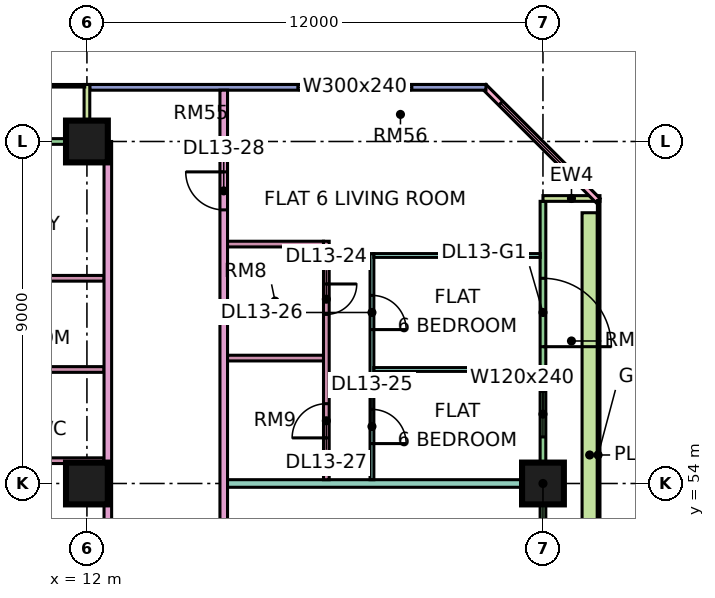
"""IFC4 building model, lengths in metres.
Left out: names, types, materials, properties, quantities, classifications, styles, units other than length and angle.
Written with IfcOpenShell. Run it as: python <this file> out.ifc"""

import sys

from ifc_helpers import new_model, si_unit, direction, frame, frame_2d, origin, origin_2d, place, context, subcontext, project, spatial, rectangle, extrude, element, fill, save


model = new_model("IFC4")
c1 = context("Model", 3, precision=1e-05, world=origin(), true_north=direction((0.0, 1.0)))
c2 = subcontext(c1, "Body", "Model", "MODEL_VIEW")
j1 = project(units=[si_unit("LENGTHUNIT", "METRE"), si_unit("PLANEANGLEUNIT", "RADIAN")], contexts=[c1])
p1 = place(None, origin())
s1 = spatial("IfcSite", under=j1, at=p1, CompositionType="ELEMENT")
p2 = place(p1, origin())
s2 = spatial("IfcBuilding", under=s1, at=p2, CompositionType="ELEMENT")
p3 = place(p2, frame((0.0, 0.0, 63.9)))
s3 = spatial("IfcBuildingStorey", under=s2, at=p3, CompositionType="ELEMENT", Elevation=63.9)
for number, where, z_axis, x_axis in (
    (1, (12.0, 54.0, 0.0), (0.0, 0.0, 1.0), (1.0, 0.0, 0.0)),
    (2, (12.0, 63.0, 0.0), (0.0, 0.0, 1.0), (1.0, 0.0, 0.0)),
    (3, (24.0, 54.0, 0.0), (0.0, 0.0, 1.0), (1.0, 0.0, 0.0)),
):
    element("IfcColumn", number, at=place(p3, frame(where, z_axis=z_axis, x_axis=x_axis)), inside=s3, PredefinedType="COLUMN", context=c2, shape_type="SweptSolid", body=[
        extrude(rectangle(XDim=1.1, YDim=1.1, at=origin_2d()), origin(), (0.0, 0.0, 1.0), 3.75),
    ])
p4 = place(p3, frame((24.0, 48.075, 0.0), z_axis=(0.0, 0.0, 1.0), x_axis=(0.0, 1.0, 0.0)))
e4 = element("IfcWall", 4, at=p4, inside=s3, PredefinedType="SOLIDWALL", context=c2, shape_type="SweptSolid", body=[
    extrude(rectangle(XDim=13.35, YDim=0.15, at=frame_2d((6.675, 0.0))), origin(), (0.0, 0.0, 1.0), 3.35),
])
p5 = place(p4, frame((0.538, 0.0, 0.45)))
e5 = element("IfcOpeningElement", 5, at=p5, cuts=e4, PredefinedType="OPENING", context=c2, shape_type="SweptSolid", body=[
    extrude(rectangle(XDim=4.2, YDim=2.4, at=frame_2d((2.1, 1.2))), frame((0.0, 0.085, 0.0), z_axis=(0.0, -1.0, 0.0), x_axis=(1.0, 0.0, 0.0)), (0.0, 0.0, 1.0), 0.17),
])
p6 = place(p4, frame((7.15, 0.0, 0.45)))
e6 = element("IfcOpeningElement", 6, at=p6, cuts=e4, PredefinedType="OPENING", context=c2, shape_type="SweptSolid", body=[
    extrude(rectangle(XDim=1.2, YDim=2.4, at=frame_2d((0.6, 1.2))), frame((0.0, 0.085, 0.0), z_axis=(0.0, -1.0, 0.0), x_axis=(1.0, 0.0, 0.0)), (0.0, 0.0, 1.0), 0.17),
])
p7 = place(p4, frame((9.525, 0.0, 0.0)))
e7 = element("IfcOpeningElement", 7, at=p7, cuts=e4, PredefinedType="OPENING", context=c2, shape_type="SweptSolid", body=[
    extrude(rectangle(XDim=1.8, YDim=2.4, at=frame_2d((0.9, 1.2))), frame((0.0, 0.085, 0.0), z_axis=(0.0, -1.0, 0.0), x_axis=(1.0, 0.0, 0.0)), (0.0, 0.0, 1.0), 0.17),
])
p8 = place(p3, frame((25.5, 61.5, 0.0), z_axis=(0.0, 0.0, 1.0), x_axis=(-1.0, 0.0, 0.0)))
e8 = element("IfcWall", 8, at=p8, inside=s3, PredefinedType="SOLIDWALL", context=c2, shape_type="SweptSolid", body=[
    extrude(rectangle(XDim=1.5, YDim=0.15, at=frame_2d((0.75, 0.0))), origin(), (0.0, 0.0, 1.0), 3.35),
])
p9 = place(p3, frame((25.447, 61.447, 0.0), z_axis=(0.0, 0.0, 1.0), x_axis=(-0.707106781187, 0.707106781187, 0.0)))
e9 = element("IfcWall", 9, at=p9, inside=s3, PredefinedType="SOLIDWALL", context=c2, shape_type="SweptSolid", body=[
    extrude(rectangle(XDim=4.243, YDim=0.15, at=frame_2d((2.121, 0.0))), origin(), (0.0, 0.0, 1.0), 3.35),
])
p10 = place(p9, frame((0.621, 0.0, 0.45)))
e10 = element("IfcOpeningElement", 10, at=p10, cuts=e9, PredefinedType="OPENING", context=c2, shape_type="SweptSolid", body=[
    extrude(rectangle(XDim=3.0, YDim=2.4, at=frame_2d((1.5, 1.2))), frame((0.0, 0.085, 0.0), z_axis=(0.0, -1.0, 0.0), x_axis=(1.0, 0.0, 0.0)), (0.0, 0.0, 1.0), 0.17),
])
p11 = place(p3, frame((22.5, 64.425, 0.0), z_axis=(0.0, 0.0, 1.0), x_axis=(-1.0, 0.0, 0.0)))
e11 = element("IfcWall", 11, at=p11, inside=s3, PredefinedType="SOLIDWALL", context=c2, shape_type="SweptSolid", body=[
    extrude(rectangle(XDim=10.425, YDim=0.15, at=frame_2d((5.212, 0.0))), origin(), (0.0, 0.0, 1.0), 3.35),
])
p12 = place(p11, frame((1.95, 0.0, 0.45)))
e12 = element("IfcOpeningElement", 12, at=p12, cuts=e11, PredefinedType="OPENING", context=c2, shape_type="SweptSolid", body=[
    extrude(rectangle(XDim=3.0, YDim=2.4, at=frame_2d((1.5, 1.2))), frame((0.0, 0.085, 0.0), z_axis=(0.0, -1.0, 0.0), x_axis=(1.0, 0.0, 0.0)), (0.0, 0.0, 1.0), 0.17),
])
p13 = place(p3, frame((11.925, 63.0, 0.0), z_axis=(0.0, 0.0, 1.0), x_axis=(-1.0, 0.0, 0.0)))
e13 = element("IfcWall", 13, at=p13, inside=s3, PredefinedType="SOLIDWALL", context=c2, shape_type="SweptSolid", body=[
    extrude(rectangle(XDim=10.35, YDim=0.15, at=frame_2d((5.175, 0.0))), origin(), (0.0, 0.0, 1.0), 3.35),
])
p14 = place(p13, frame((2.075, 0.0, 1.7)))
e14 = element("IfcOpeningElement", 14, at=p14, cuts=e13, PredefinedType="OPENING", context=c2, shape_type="SweptSolid", body=[
    extrude(rectangle(XDim=1.2, YDim=0.9, at=frame_2d((0.6, 0.45))), frame((0.0, 0.085, 0.0), z_axis=(0.0, -1.0, 0.0), x_axis=(1.0, 0.0, 0.0)), (0.0, 0.0, 1.0), 0.17),
])
p15 = place(p13, frame((7.262, 0.0, 0.0)))
e15 = element("IfcOpeningElement", 15, at=p15, cuts=e13, PredefinedType="OPENING", context=c2, shape_type="SweptSolid", body=[
    extrude(rectangle(XDim=1.8, YDim=2.4, at=frame_2d((0.9, 1.2))), frame((0.0, 0.085, 0.0), z_axis=(0.0, -1.0, 0.0), x_axis=(1.0, 0.0, 0.0)), (0.0, 0.0, 1.0), 0.17),
])
p16 = place(p3, frame((12.0, 64.5, 0.0), z_axis=(0.0, 0.0, 1.0), x_axis=(0.0, -1.0, 0.0)))
e16 = element("IfcWall", 16, at=p16, inside=s3, PredefinedType="SOLIDWALL", context=c2, shape_type="SweptSolid", body=[
    extrude(rectangle(XDim=1.5, YDim=0.15, at=frame_2d((0.75, 0.0))), origin(), (0.0, 0.0, 1.0), 3.35),
])
p17 = place(p3, frame((25.229, 48.375, 0.0), z_axis=(0.0, 0.0, 1.0), x_axis=(0.0, 1.0, 0.0)))
e17 = element("IfcWall", 17, at=p17, inside=s3, PredefinedType="SOLIDWALL", context=c2, shape_type="SweptSolid", body=[
    extrude(rectangle(XDim=12.75, YDim=0.4, at=frame_2d((6.375, 0.0))), origin(), (0.0, 0.0, 1.0), 0.7),
])
for number, where, z_axis, x_axis in (
    (18, (7.225, 54.6, 0.0), (0.0, 0.0, 1.0), (1.0, 0.0, 0.0)),
    (19, (7.225, 57.0, 0.0), (0.0, 0.0, 1.0), (1.0, 0.0, 0.0)),
    (20, (7.225, 59.4, 0.0), (0.0, 0.0, 1.0), (1.0, 0.0, 0.0)),
):
    element("IfcWall", number, at=place(p3, frame(where, z_axis=z_axis, x_axis=x_axis)), inside=s3, PredefinedType="PARTITIONING", context=c2, shape_type="SweptSolid", body=[
        extrude(rectangle(XDim=5.225, YDim=0.15, at=frame_2d((2.612, 0.0))), origin(), (0.0, 0.0, 1.0), 3.35),
    ])
p18 = place(p3, frame((12.55, 20.0, 0.0), z_axis=(0.0, 0.0, 1.0), x_axis=(0.0, 1.0, 0.0)))
e21 = element("IfcWall", 21, at=p18, inside=s3, PredefinedType="PARTITIONING", context=c2, shape_type="SweptSolid", body=[
    extrude(rectangle(XDim=43.0, YDim=0.2, at=frame_2d((21.5, 0.0))), origin(), (0.0, 0.0, 1.0), 3.35),
])
p19 = place(p18, frame((25.8, 0.0, 0.0)))
e22 = element("IfcOpeningElement", 22, at=p19, cuts=e21, PredefinedType="OPENING", context=c2, shape_type="SweptSolid", body=[
    extrude(rectangle(XDim=1.0, YDim=2.1, at=frame_2d((0.5, 1.05))), frame((0.0, 0.11, 0.0), z_axis=(0.0, -1.0, 0.0), x_axis=(1.0, 0.0, 0.0)), (0.0, 0.0, 1.0), 0.22),
])
p20 = place(p18, frame((0.6, 0.0, 0.0)))
e23 = element("IfcOpeningElement", 23, at=p20, cuts=e21, PredefinedType="OPENING", context=c2, shape_type="SweptSolid", body=[
    extrude(rectangle(XDim=1.2, YDim=2.1, at=frame_2d((0.6, 1.05))), frame((0.0, 0.11, 0.0), z_axis=(0.0, -1.0, 0.0), x_axis=(1.0, 0.0, 0.0)), (0.0, 0.0, 1.0), 0.22),
])
p21 = place(p18, frame((14.25, 0.0, 0.0)))
e24 = element("IfcOpeningElement", 24, at=p21, cuts=e21, PredefinedType="OPENING", context=c2, shape_type="SweptSolid", body=[
    extrude(rectangle(XDim=1.0, YDim=2.1, at=frame_2d((0.5, 1.05))), frame((0.0, 0.11, 0.0), z_axis=(0.0, -1.0, 0.0), x_axis=(1.0, 0.0, 0.0)), (0.0, 0.0, 1.0), 0.22),
])
p22 = place(p3, frame((15.6, 51.225, 0.0), z_axis=(0.0, 0.0, 1.0), x_axis=(0.0, 1.0, 0.0)))
e25 = element("IfcWall", 25, at=p22, inside=s3, PredefinedType="PARTITIONING", context=c2, shape_type="SweptSolid", body=[
    extrude(rectangle(XDim=13.125, YDim=0.2, at=frame_2d((6.562, 0.0))), origin(), (0.0, 0.0, 1.0), 3.35),
])
p23 = place(p22, frame((9.975, 0.0, 0.0)))
e26 = element("IfcOpeningElement", 26, at=p23, cuts=e25, PredefinedType="OPENING", context=c2, shape_type="SweptSolid", body=[
    extrude(rectangle(XDim=1.0, YDim=2.1, at=frame_2d((0.5, 1.05))), frame((0.0, 0.11, 0.0), z_axis=(0.0, -1.0, 0.0), x_axis=(1.0, 0.0, 0.0)), (0.0, 0.0, 1.0), 0.22),
])
p24 = place(p3, frame((15.7, 54.0, 0.0), z_axis=(0.0, 0.0, 1.0), x_axis=(1.0, 0.0, 0.0)))
e27 = element("IfcWall", 27, at=p24, inside=s3, PredefinedType="PARTITIONING", context=c2, shape_type="SweptSolid", body=[
    extrude(rectangle(XDim=8.226, YDim=0.2, at=frame_2d((4.113, 0.0))), origin(), (0.0, 0.0, 1.0), 3.35),
])
for number, where, z_axis, x_axis in (
    (28, (15.7, 57.3, 0.0), (0.0, 0.0, 1.0), (1.0, 0.0, 0.0)),
    (29, (15.7, 60.3, 0.0), (0.0, 0.0, 1.0), (1.0, 0.0, 0.0)),
):
    element("IfcWall", number, at=place(p3, frame(where, z_axis=z_axis, x_axis=x_axis)), inside=s3, PredefinedType="PARTITIONING", context=c2, shape_type="SweptSolid", body=[
        extrude(rectangle(XDim=2.525, YDim=0.15, at=frame_2d((1.263, 0.0))), origin(), (0.0, 0.0, 1.0), 3.35),
    ])
p25 = place(p3, frame((18.3, 54.1, 0.0), z_axis=(0.0, 0.0, 1.0), x_axis=(0.0, 1.0, 0.0)))
e30 = element("IfcWall", 30, at=p25, inside=s3, PredefinedType="PARTITIONING", context=c2, shape_type="SweptSolid", body=[
    extrude(rectangle(XDim=6.275, YDim=0.15, at=frame_2d((3.137, 0.0))), origin(), (0.0, 0.0, 1.0), 3.35),
])
p26 = place(p25, frame((4.35, 0.0, 0.0)))
e31 = element("IfcOpeningElement", 31, at=p26, cuts=e30, PredefinedType="OPENING", context=c2, shape_type="SweptSolid", body=[
    extrude(rectangle(XDim=0.8, YDim=2.1, at=frame_2d((0.4, 1.05))), frame((0.0, 0.085, 0.0), z_axis=(0.0, -1.0, 0.0), x_axis=(1.0, 0.0, 0.0)), (0.0, 0.0, 1.0), 0.17),
])
p27 = place(p25, frame((1.1, 0.0, 0.0)))
e32 = element("IfcOpeningElement", 32, at=p27, cuts=e30, PredefinedType="OPENING", context=c2, shape_type="SweptSolid", body=[
    extrude(rectangle(XDim=0.9, YDim=2.1, at=frame_2d((0.45, 1.05))), frame((0.0, 0.085, 0.0), z_axis=(0.0, -1.0, 0.0), x_axis=(1.0, 0.0, 0.0)), (0.0, 0.0, 1.0), 0.17),
])
p28 = place(p3, frame((19.5, 54.1, 0.0), z_axis=(0.0, 0.0, 1.0), x_axis=(0.0, 1.0, 0.0)))
e33 = element("IfcWall", 33, at=p28, inside=s3, PredefinedType="PARTITIONING", context=c2, shape_type="SweptSolid", body=[
    extrude(rectangle(XDim=5.95, YDim=0.1, at=frame_2d((2.975, 0.0))), origin(), (0.0, 0.0, 1.0), 3.35),
])
p29 = place(p28, frame((0.95, 0.0, 0.0)))
e34 = element("IfcOpeningElement", 34, at=p29, cuts=e33, PredefinedType="OPENING", context=c2, shape_type="SweptSolid", body=[
    extrude(rectangle(XDim=0.9, YDim=2.1, at=frame_2d((0.45, 1.05))), frame((0.0, 0.06, 0.0), z_axis=(0.0, -1.0, 0.0), x_axis=(1.0, 0.0, 0.0)), (0.0, 0.0, 1.0), 0.12),
])
p30 = place(p28, frame((3.95, 0.0, 0.0)))
e35 = element("IfcOpeningElement", 35, at=p30, cuts=e33, PredefinedType="OPENING", context=c2, shape_type="SweptSolid", body=[
    extrude(rectangle(XDim=0.9, YDim=2.1, at=frame_2d((0.45, 1.05))), frame((0.0, 0.06, 0.0), z_axis=(0.0, -1.0, 0.0), x_axis=(1.0, 0.0, 0.0)), (0.0, 0.0, 1.0), 0.12),
])
for number, where, z_axis, x_axis in (
    (36, (19.55, 57.0, 0.0), (0.0, 0.0, 1.0), (1.0, 0.0, 0.0)),
    (37, (19.55, 60.0, 0.0), (0.0, 0.0, 1.0), (1.0, 0.0, 0.0)),
):
    element("IfcWall", number, at=place(p3, frame(where, z_axis=z_axis, x_axis=x_axis)), inside=s3, PredefinedType="PARTITIONING", context=c2, shape_type="SweptSolid", body=[
        extrude(rectangle(XDim=4.376, YDim=0.1, at=frame_2d((2.188, 0.0))), origin(), (0.0, 0.0, 1.0), 3.35),
    ])
p31 = place(p6, origin())
e38 = element("IfcWindow", 38, at=p31, inside=s3, PartitioningType="SINGLE_PANEL", PredefinedType="WINDOW", context=c2, shape_type="SweptSolid", body=[
    extrude(rectangle(XDim=1.2, YDim=2.4, at=frame_2d((0.6, 1.2))), frame((0.0, 0.03, 0.0), z_axis=(0.0, -1.0, 0.0), x_axis=(1.0, 0.0, 0.0)), (0.0, 0.0, 1.0), 0.06),
])
fill(e6, e38)
p32 = place(p7, frame((1.8, 0.0, 0.0), z_axis=(0.0, 0.0, 1.0), x_axis=(-1.0, 0.0, 0.0)))
e39 = element("IfcDoor", 39, at=p32, inside=s3, OperationType="DOUBLE_DOOR_SINGLE_SWING", PredefinedType="DOOR", context=c2, shape_type="SweptSolid", body=[
    extrude(rectangle(XDim=1.8, YDim=2.4, at=frame_2d((0.9, 1.2))), frame((0.0, 0.025, 0.0), z_axis=(0.0, -1.0, 0.0), x_axis=(1.0, 0.0, 0.0)), (0.0, 0.0, 1.0), 0.05),
])
fill(e7, e39)
p33 = place(p10, origin())
e40 = element("IfcWindow", 40, at=p33, inside=s3, PartitioningType="SINGLE_PANEL", PredefinedType="WINDOW", context=c2, shape_type="SweptSolid", body=[
    extrude(rectangle(XDim=3.0, YDim=2.4, at=frame_2d((1.5, 1.2))), frame((0.0, 0.03, 0.0), z_axis=(0.0, -1.0, 0.0), x_axis=(1.0, 0.0, 0.0)), (0.0, 0.0, 1.0), 0.06),
])
fill(e10, e40)
p34 = place(p12, origin())
e41 = element("IfcWindow", 41, at=p34, inside=s3, PartitioningType="SINGLE_PANEL", PredefinedType="WINDOW", context=c2, shape_type="SweptSolid", body=[
    extrude(rectangle(XDim=3.0, YDim=2.4, at=frame_2d((1.5, 1.2))), frame((0.0, 0.03, 0.0), z_axis=(0.0, -1.0, 0.0), x_axis=(1.0, 0.0, 0.0)), (0.0, 0.0, 1.0), 0.06),
])
fill(e12, e41)
p35 = place(p26, origin())
e42 = element("IfcDoor", 42, at=p35, inside=s3, OperationType="SINGLE_SWING_RIGHT", PredefinedType="DOOR", context=c2, shape_type="SweptSolid", body=[
    extrude(rectangle(XDim=0.8, YDim=2.1, at=frame_2d((0.4, 1.05))), frame((0.0, 0.025, 0.0), z_axis=(0.0, -1.0, 0.0), x_axis=(1.0, 0.0, 0.0)), (0.0, 0.0, 1.0), 0.05),
])
fill(e31, e42)
p36 = place(p29, frame((0.9, 0.0, 0.0), z_axis=(0.0, 0.0, 1.0), x_axis=(-1.0, 0.0, 0.0)))
e43 = element("IfcDoor", 43, at=p36, inside=s3, OperationType="SINGLE_SWING_LEFT", PredefinedType="DOOR", context=c2, shape_type="SweptSolid", body=[
    extrude(rectangle(XDim=0.9, YDim=2.1, at=frame_2d((0.45, 1.05))), frame((0.0, 0.025, 0.0), z_axis=(0.0, -1.0, 0.0), x_axis=(1.0, 0.0, 0.0)), (0.0, 0.0, 1.0), 0.05),
])
fill(e34, e43)
p37 = place(p30, frame((0.9, 0.0, 0.0), z_axis=(0.0, 0.0, 1.0), x_axis=(-1.0, 0.0, 0.0)))
e44 = element("IfcDoor", 44, at=p37, inside=s3, OperationType="SINGLE_SWING_LEFT", PredefinedType="DOOR", context=c2, shape_type="SweptSolid", body=[
    extrude(rectangle(XDim=0.9, YDim=2.1, at=frame_2d((0.45, 1.05))), frame((0.0, 0.025, 0.0), z_axis=(0.0, -1.0, 0.0), x_axis=(1.0, 0.0, 0.0)), (0.0, 0.0, 1.0), 0.05),
])
fill(e35, e44)
p38 = place(p27, origin())
e45 = element("IfcDoor", 45, at=p38, inside=s3, OperationType="SINGLE_SWING_LEFT", PredefinedType="DOOR", context=c2, shape_type="SweptSolid", body=[
    extrude(rectangle(XDim=0.9, YDim=2.1, at=frame_2d((0.45, 1.05))), frame((0.0, 0.025, 0.0), z_axis=(0.0, -1.0, 0.0), x_axis=(1.0, 0.0, 0.0)), (0.0, 0.0, 1.0), 0.05),
])
fill(e32, e45)
p39 = place(p23, frame((1.0, 0.0, 0.0), z_axis=(0.0, 0.0, 1.0), x_axis=(-1.0, 0.0, 0.0)))
e46 = element("IfcDoor", 46, at=p39, inside=s3, OperationType="SINGLE_SWING_RIGHT", PredefinedType="DOOR", context=c2, shape_type="SweptSolid", body=[
    extrude(rectangle(XDim=1.0, YDim=2.1, at=frame_2d((0.5, 1.05))), frame((0.0, 0.025, 0.0), z_axis=(0.0, -1.0, 0.0), x_axis=(1.0, 0.0, 0.0)), (0.0, 0.0, 1.0), 0.05),
])
fill(e26, e46)
save(model, sys.argv[1])
